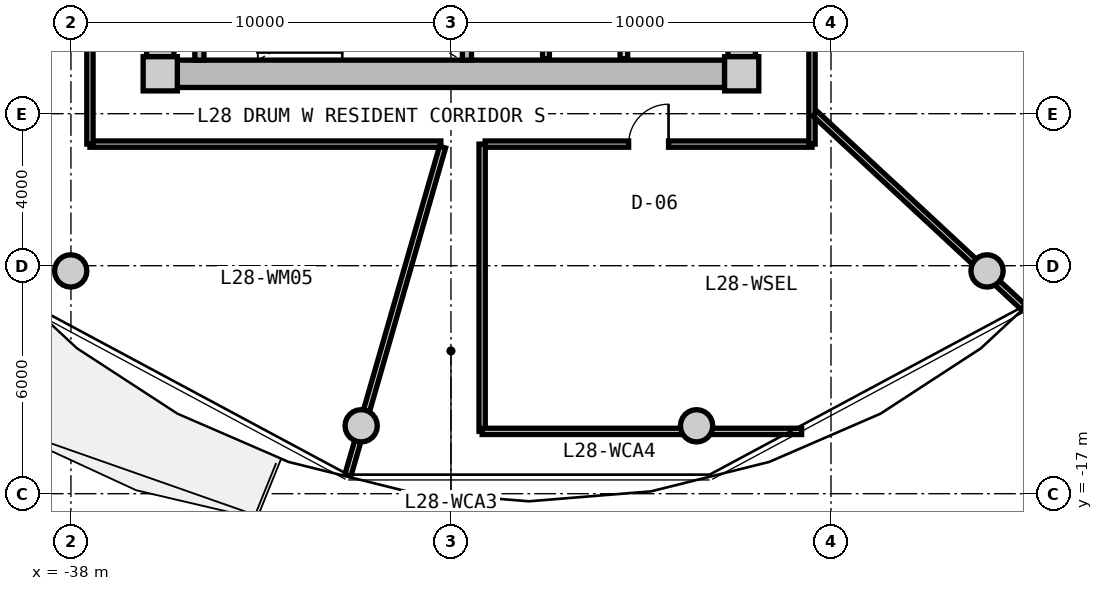
"""IFC4 building model, lengths in metres.
Left out: names, types, materials, properties, quantities, classifications, styles, units other than length and angle.
Written with IfcOpenShell. Run it as: python <this file> out.ifc"""

import sys

from ifc_helpers import new_model, si_unit, direction, frame, frame_2d, origin, origin_2d, place, context, subcontext, project, spatial, rectangle, circle, extrude, source, transform, mapped, element, fill, save


model = new_model("IFC4")
c1 = context("Model", 3, precision=1e-05, world=origin(), true_north=direction((0.0, 1.0)))
c2 = subcontext(c1, "Body", "Model", "MODEL_VIEW")
j1 = project(units=[si_unit("LENGTHUNIT", "METRE"), si_unit("PLANEANGLEUNIT", "RADIAN")], contexts=[c1])
p1 = place(None, origin())
s1 = spatial("IfcSite", under=j1, at=p1, CompositionType="ELEMENT")
p2 = place(p1, origin())
s2 = spatial("IfcBuilding", under=s1, at=p2, CompositionType="ELEMENT")
p3 = place(p2, frame((0.0, 0.0, 93.2)))
s3 = spatial("IfcBuildingStorey", under=s2, at=p3, CompositionType="ELEMENT", Elevation=93.2)
m1 = source(origin(), c2, "Body", "SweptSolid", [
    extrude(rectangle(XDim=0.9, YDim=0.9, at=origin_2d()), origin(), (0.0, 0.0, 1.0), 3.05),
])
for number, where, z_axis, x_axis in (
    (1, (-35.65, -5.95, 0.0), (0.0, 0.0, 1.0), (1.0, 0.0, 0.0)),
    (2, (-20.35, -5.95, 0.0), (0.0, 0.0, 1.0), (1.0, 0.0, 0.0)),
):
    element("IfcColumn", number, at=place(p3, frame(where, z_axis=z_axis, x_axis=x_axis)), inside=s3, PredefinedType="COLUMN", context=c2, shape_type="MappedRepresentation", body=[
        mapped(m1, transform((0.0, 0.0, 0.0), x_axis=(1.0, 0.0, 0.0), y_axis=(0.0, 1.0, 0.0), z_axis=(0.0, 0.0, 1.0), scale=1.0)),
    ])
m2 = source(origin(), c2, "Body", "SweptSolid", [
    extrude(rectangle(XDim=14.4, YDim=0.72, at=frame_2d((7.2, 0.0))), origin(), (0.0, 0.0, 1.0), 2.79),
])
p4 = place(p3, frame((-20.8, -5.95, 0.0), z_axis=(0.0, 0.0, 1.0), x_axis=(-1.0, 0.0, 0.0)))
e3 = element("IfcWall", 3, at=p4, inside=s3, PredefinedType="SHEAR", context=c2, shape_type="MappedRepresentation", body=[
    mapped(m2, transform((0.0, 0.0, 0.0), x_axis=(1.0, 0.0, 0.0), y_axis=(0.0, 1.0, 0.0), z_axis=(0.0, 0.0, 1.0), scale=1.0)),
])
m3 = source(origin(), c2, "Body", "SweptSolid", [
    extrude(rectangle(XDim=11.0, YDim=0.72, at=frame_2d((5.5, 0.0))), origin(), (0.0, 0.0, 1.0), 2.79),
])
p5 = place(p3, frame((-35.65, -5.5, 0.0), z_axis=(0.0, 0.0, 1.0), x_axis=(0.0, 1.0, 0.0)))
e4 = element("IfcWall", 4, at=p5, inside=s3, PredefinedType="SHEAR", context=c2, shape_type="MappedRepresentation", body=[
    mapped(m3, transform((0.0, 0.0, 0.0), x_axis=(1.0, 0.0, 0.0), y_axis=(0.0, 1.0, 0.0), z_axis=(0.0, 0.0, 1.0), scale=1.0)),
])
p6 = place(p5, frame((3.8, 0.0, 0.0)))
e5 = element("IfcOpeningElement", 5, at=p6, cuts=e4, PredefinedType="OPENING", context=c2, shape_type="SweptSolid", body=[
    extrude(rectangle(XDim=1.2, YDim=2.15, at=frame_2d((0.6, 1.075))), frame((0.0, 0.37, 0.0), z_axis=(0.0, -1.0, 0.0), x_axis=(1.0, 0.0, 0.0)), (0.0, 0.0, 1.0), 0.74),
])
p7 = place(p3, frame((-20.35, 5.5, 0.0), z_axis=(0.0, 0.0, 1.0), x_axis=(0.0, -1.0, 0.0)))
e6 = element("IfcWall", 6, at=p7, inside=s3, PredefinedType="SHEAR", context=c2, shape_type="MappedRepresentation", body=[
    mapped(m3, transform((0.0, 0.0, 0.0), x_axis=(1.0, 0.0, 0.0), y_axis=(0.0, 1.0, 0.0), z_axis=(0.0, 0.0, 1.0), scale=1.0)),
])
p8 = place(p7, frame((5.65, 0.0, 0.0)))
e7 = element("IfcOpeningElement", 7, at=p8, cuts=e6, PredefinedType="OPENING", context=c2, shape_type="SweptSolid", body=[
    extrude(rectangle(XDim=1.2, YDim=2.15, at=frame_2d((0.6, 1.075))), frame((0.0, 0.37, 0.0), z_axis=(0.0, -1.0, 0.0), x_axis=(1.0, 0.0, 0.0)), (0.0, 0.0, 1.0), 0.74),
])
p9 = place(p7, frame((9.3, 0.0, 0.0)))
e8 = element("IfcOpeningElement", 8, at=p9, cuts=e6, PredefinedType="OPENING", context=c2, shape_type="SweptSolid", body=[
    extrude(rectangle(XDim=1.0, YDim=2.1, at=frame_2d((0.5, 1.05))), frame((0.0, 0.37, 0.0), z_axis=(0.0, -1.0, 0.0), x_axis=(1.0, 0.0, 0.0)), (0.0, 0.0, 1.0), 0.74),
])
m4 = source(origin(), c2, "Body", "SweptSolid", [
    extrude(circle(Radius=0.425, at=origin_2d()), origin(), (0.0, 0.0, 1.0), 3.05),
])
for number, where, z_axis, x_axis in (
    (9, (-38.006, -11.137, 0.0), (0.0, 0.0, 1.0), (1.0, 0.0, 0.0)),
    (10, (-30.363, -15.213, 0.0), (0.0, 0.0, 1.0), (1.0, 0.0, 0.0)),
    (11, (-21.537, -15.213, 0.0), (0.0, 0.0, 1.0), (1.0, 0.0, 0.0)),
    (12, (-13.894, -11.137, 0.0), (0.0, 0.0, 1.0), (1.0, 0.0, 0.0)),
):
    element("IfcColumn", number, at=place(p3, frame(where, z_axis=z_axis, x_axis=x_axis)), inside=s3, PredefinedType="COLUMN", context=c2, shape_type="MappedRepresentation", body=[
        mapped(m4, transform((0.0, 0.0, 0.0), x_axis=(1.0, 0.0, 0.0), y_axis=(0.0, 1.0, 0.0), z_axis=(0.0, 0.0, 1.0), scale=1.0)),
    ])
m5 = source(origin(), c2, "Body", "SweptSolid", [
    extrude(rectangle(XDim=3.14, YDim=0.24, at=frame_2d((1.57, 0.0))), origin(), (0.0, 0.0, 1.0), 2.79),
])
for number, where, z_axis, x_axis in (
    (13, (-34.62, -5.59, 0.0), (0.0, 0.0, 1.0), (0.0, 1.0, 0.0)),
    (14, (-27.58, -5.59, 0.0), (0.0, 0.0, 1.0), (0.0, 1.0, 0.0)),
):
    element("IfcWall", number, at=place(p3, frame(where, z_axis=z_axis, x_axis=x_axis)), inside=s3, PredefinedType="PARTITIONING", context=c2, shape_type="MappedRepresentation", body=[
        mapped(m5, transform((0.0, 0.0, 0.0), x_axis=(1.0, 0.0, 0.0), y_axis=(0.0, 1.0, 0.0), z_axis=(0.0, 0.0, 1.0), scale=1.0)),
    ])
m6 = source(origin(), c2, "Body", "SweptSolid", [
    extrude(rectangle(XDim=3.8, YDim=0.2, at=frame_2d((1.9, 0.0))), origin(), (0.0, 0.0, 1.0), 2.775),
])
p10 = place(p3, frame((-23.45, -5.55, 0.0), z_axis=(0.0, 0.0, 1.0), x_axis=(0.0, 1.0, 0.0)))
e15 = element("IfcWall", 15, at=p10, inside=s3, PredefinedType="PARTITIONING", context=c2, shape_type="MappedRepresentation", body=[
    mapped(m6, transform((0.0, 0.0, 0.0), x_axis=(1.0, 0.0, 0.0), y_axis=(0.0, 1.0, 0.0), z_axis=(0.0, 0.0, 1.0), scale=1.0)),
])
m7 = source(origin(), c2, "Body", "SweptSolid", [
    extrude(rectangle(XDim=3.22, YDim=0.18, at=frame_2d((1.61, 0.0))), origin(), (0.0, 0.0, 1.0), 2.775),
])
p11 = place(p3, frame((-25.5, -5.55, 0.0), z_axis=(0.0, 0.0, 1.0), x_axis=(0.0, 1.0, 0.0)))
e16 = element("IfcWall", 16, at=p11, inside=s3, PredefinedType="PARTITIONING", context=c2, shape_type="MappedRepresentation", body=[
    mapped(m7, transform((0.0, 0.0, 0.0), x_axis=(1.0, 0.0, 0.0), y_axis=(0.0, 1.0, 0.0), z_axis=(0.0, 0.0, 1.0), scale=1.0)),
])
m8 = source(origin(), c2, "Body", "SweptSolid", [
    extrude(rectangle(XDim=8.6, YDim=0.165, at=frame_2d((4.3, 0.0))), origin(), (0.0, 0.0, 1.0), 2.775),
])
p12 = place(p3, frame((-18.5, -7.8, 0.0), z_axis=(0.0, 0.0, 1.0), x_axis=(-1.0, 0.0, 0.0)))
e17 = element("IfcWall", 17, at=p12, inside=s3, PredefinedType="PARTITIONING", context=c2, shape_type="MappedRepresentation", body=[
    mapped(m8, transform((0.0, 0.0, 0.0), x_axis=(1.0, 0.0, 0.0), y_axis=(0.0, 1.0, 0.0), z_axis=(0.0, 0.0, 1.0), scale=1.0)),
])
p13 = place(p12, frame((3.775, 0.0, 0.0)))
e18 = element("IfcOpeningElement", 18, at=p13, cuts=e17, PredefinedType="OPENING", context=c2, shape_type="SweptSolid", body=[
    extrude(rectangle(XDim=1.05, YDim=2.15, at=frame_2d((0.525, 1.075))), frame((0.0, 0.093, 0.0), z_axis=(0.0, -1.0, 0.0), x_axis=(1.0, 0.0, 0.0)), (0.0, 0.0, 1.0), 0.185),
])
m9 = source(origin(), c2, "Body", "SweptSolid", [
    extrude(rectangle(XDim=9.234, YDim=0.165, at=frame_2d((4.617, 0.0))), origin(), (0.0, 0.0, 1.0), 2.775),
])
p14 = place(p3, frame((-28.266, -7.8, 0.0), z_axis=(0.0, 0.0, 1.0), x_axis=(-1.0, 0.0, 0.0)))
e19 = element("IfcWall", 19, at=p14, inside=s3, PredefinedType="PARTITIONING", context=c2, shape_type="MappedRepresentation", body=[
    mapped(m9, transform((0.0, 0.0, 0.0), x_axis=(1.0, 0.0, 0.0), y_axis=(0.0, 1.0, 0.0), z_axis=(0.0, 0.0, 1.0), scale=1.0)),
])
m10 = source(origin(), c2, "Body", "SweptSolid", [
    extrude(rectangle(XDim=15.6, YDim=0.165, at=frame_2d((7.8, 0.0))), origin(), (0.0, 0.0, 1.0), 2.775),
])
p15 = place(p3, frame((-37.5, -7.8, 0.0), z_axis=(0.0, 0.0, 1.0), x_axis=(0.0, 1.0, 0.0)))
e20 = element("IfcWall", 20, at=p15, inside=s3, PredefinedType="PARTITIONING", context=c2, shape_type="MappedRepresentation", body=[
    mapped(m10, transform((0.0, 0.0, 0.0), x_axis=(1.0, 0.0, 0.0), y_axis=(0.0, 1.0, 0.0), z_axis=(0.0, 0.0, 1.0), scale=1.0)),
])
p16 = place(p15, frame((11.994, 0.0, 0.0)))
e21 = element("IfcOpeningElement", 21, at=p16, cuts=e20, PredefinedType="OPENING", context=c2, shape_type="SweptSolid", body=[
    extrude(rectangle(XDim=1.25, YDim=2.2, at=frame_2d((0.625, 1.1))), frame((0.0, 0.093, 0.0), z_axis=(0.0, -1.0, 0.0), x_axis=(1.0, 0.0, 0.0)), (0.0, 0.0, 1.0), 0.185),
])
p17 = place(p15, frame((4.867, 0.0, 0.0)))
e22 = element("IfcOpeningElement", 22, at=p17, cuts=e20, PredefinedType="OPENING", context=c2, shape_type="SweptSolid", body=[
    extrude(rectangle(XDim=1.25, YDim=2.2, at=frame_2d((0.625, 1.1))), frame((0.0, 0.093, 0.0), z_axis=(0.0, -1.0, 0.0), x_axis=(1.0, 0.0, 0.0)), (0.0, 0.0, 1.0), 0.185),
])
p18 = place(p3, frame((-18.5, 7.8, 0.0), z_axis=(0.0, 0.0, 1.0), x_axis=(0.0, -1.0, 0.0)))
e23 = element("IfcWall", 23, at=p18, inside=s3, PredefinedType="PARTITIONING", context=c2, shape_type="MappedRepresentation", body=[
    mapped(m10, transform((0.0, 0.0, 0.0), x_axis=(1.0, 0.0, 0.0), y_axis=(0.0, 1.0, 0.0), z_axis=(0.0, 0.0, 1.0), scale=1.0)),
])
p19 = place(p18, frame((9.734, 0.0, 0.0)))
e24 = element("IfcOpeningElement", 24, at=p19, cuts=e23, PredefinedType="OPENING", context=c2, shape_type="SweptSolid", body=[
    extrude(rectangle(XDim=1.25, YDim=2.2, at=frame_2d((0.625, 1.1))), frame((0.0, 0.093, 0.0), z_axis=(0.0, -1.0, 0.0), x_axis=(1.0, 0.0, 0.0)), (0.0, 0.0, 1.0), 0.185),
])
p20 = place(p18, frame((4.739, 0.0, 0.0)))
e25 = element("IfcOpeningElement", 25, at=p20, cuts=e23, PredefinedType="OPENING", context=c2, shape_type="SweptSolid", body=[
    extrude(rectangle(XDim=0.92, YDim=2.1, at=frame_2d((0.46, 1.05))), frame((0.0, 0.093, 0.0), z_axis=(0.0, -1.0, 0.0), x_axis=(1.0, 0.0, 0.0)), (0.0, 0.0, 1.0), 0.185),
])
p21 = place(p18, frame((2.096, 0.0, 0.0)))
e26 = element("IfcOpeningElement", 26, at=p21, cuts=e23, PredefinedType="OPENING", context=c2, shape_type="SweptSolid", body=[
    extrude(rectangle(XDim=0.92, YDim=2.1, at=frame_2d((0.46, 1.05))), frame((0.0, 0.093, 0.0), z_axis=(0.0, -1.0, 0.0), x_axis=(1.0, 0.0, 0.0)), (0.0, 0.0, 1.0), 0.185),
])
m11 = source(origin(), c2, "Body", "SweptSolid", [
    extrude(rectangle(XDim=8.989, YDim=0.165, at=frame_2d((4.495, 0.0))), origin(), (0.0, 0.0, 1.0), 2.275),
])
p22 = place(p3, frame((-28.222, -7.88, 0.0), z_axis=(0.0, 0.0, 1.0), x_axis=(-0.27702323008, -0.960863221274, 0.0)))
e27 = element("IfcWall", 27, at=p22, inside=s3, PredefinedType="PARTITIONING", context=c2, shape_type="MappedRepresentation", body=[
    mapped(m11, transform((0.0, 0.0, 0.0), x_axis=(1.0, 0.0, 0.0), y_axis=(0.0, 1.0, 0.0), z_axis=(0.0, 0.0, 1.0), scale=1.0)),
])
m12 = source(origin(), c2, "Body", "SweptSolid", [
    extrude(rectangle(XDim=7.482, YDim=0.165, at=frame_2d((3.741, 0.0))), origin(), (0.0, 0.0, 1.0), 2.275),
])
p23 = place(p3, frame((-18.42, -6.998, 0.0), z_axis=(0.0, 0.0, 1.0), x_axis=(0.732508698043, -0.680757671489, 0.0)))
e28 = element("IfcWall", 28, at=p23, inside=s3, PredefinedType="PARTITIONING", context=c2, shape_type="MappedRepresentation", body=[
    mapped(m12, transform((0.0, 0.0, 0.0), x_axis=(1.0, 0.0, 0.0), y_axis=(0.0, 1.0, 0.0), z_axis=(0.0, 0.0, 1.0), scale=1.0)),
])
m13 = source(origin(), c2, "Body", "SweptSolid", [
    extrude(rectangle(XDim=7.56, YDim=0.165, at=frame_2d((3.78, 0.0))), origin(), (0.0, 0.0, 1.0), 2.775),
])
p24 = place(p3, frame((-27.18, -15.36, 0.0), z_axis=(0.0, 0.0, 1.0), x_axis=(0.0, 1.0, 0.0)))
e29 = element("IfcWall", 29, at=p24, inside=s3, PredefinedType="PARTITIONING", context=c2, shape_type="MappedRepresentation", body=[
    mapped(m13, transform((0.0, 0.0, 0.0), x_axis=(1.0, 0.0, 0.0), y_axis=(0.0, 1.0, 0.0), z_axis=(0.0, 0.0, 1.0), scale=1.0)),
])
m14 = source(origin(), c2, "Body", "SweptSolid", [
    extrude(rectangle(XDim=8.407, YDim=0.165, at=frame_2d((4.204, 0.0))), origin(), (0.0, 0.0, 1.0), 2.275),
])
p25 = place(p3, frame((-27.18, -15.36, 0.0), z_axis=(0.0, 0.0, 1.0), x_axis=(1.0, 0.0, 0.0)))
e30 = element("IfcWall", 30, at=p25, inside=s3, PredefinedType="PARTITIONING", context=c2, shape_type="MappedRepresentation", body=[
    mapped(m14, transform((0.0, 0.0, 0.0), x_axis=(1.0, 0.0, 0.0), y_axis=(0.0, 1.0, 0.0), z_axis=(0.0, 0.0, 1.0), scale=1.0)),
])
m15 = source(origin(), c2, "Body", "SweptSolid", [
    extrude(rectangle(XDim=1.05, YDim=2.15, at=frame_2d((0.525, 1.075))), frame((0.0, 0.025, 0.0), z_axis=(0.0, -1.0, 0.0), x_axis=(1.0, 0.0, 0.0)), (0.0, 0.0, 1.0), 0.05),
])
p26 = place(p13, frame((1.05, 0.0, 0.0), z_axis=(0.0, 0.0, 1.0), x_axis=(-1.0, 0.0, 0.0)))
e31 = element("IfcDoor", 31, at=p26, inside=s3, OperationType="SINGLE_SWING_RIGHT", PredefinedType="DOOR", context=c2, shape_type="MappedRepresentation", body=[
    mapped(m15, transform((0.0, 0.0, 0.0), x_axis=(1.0, 0.0, 0.0), y_axis=(0.0, 1.0, 0.0), z_axis=(0.0, 0.0, 1.0), scale=1.0)),
])
fill(e18, e31)
save(model, sys.argv[1])
